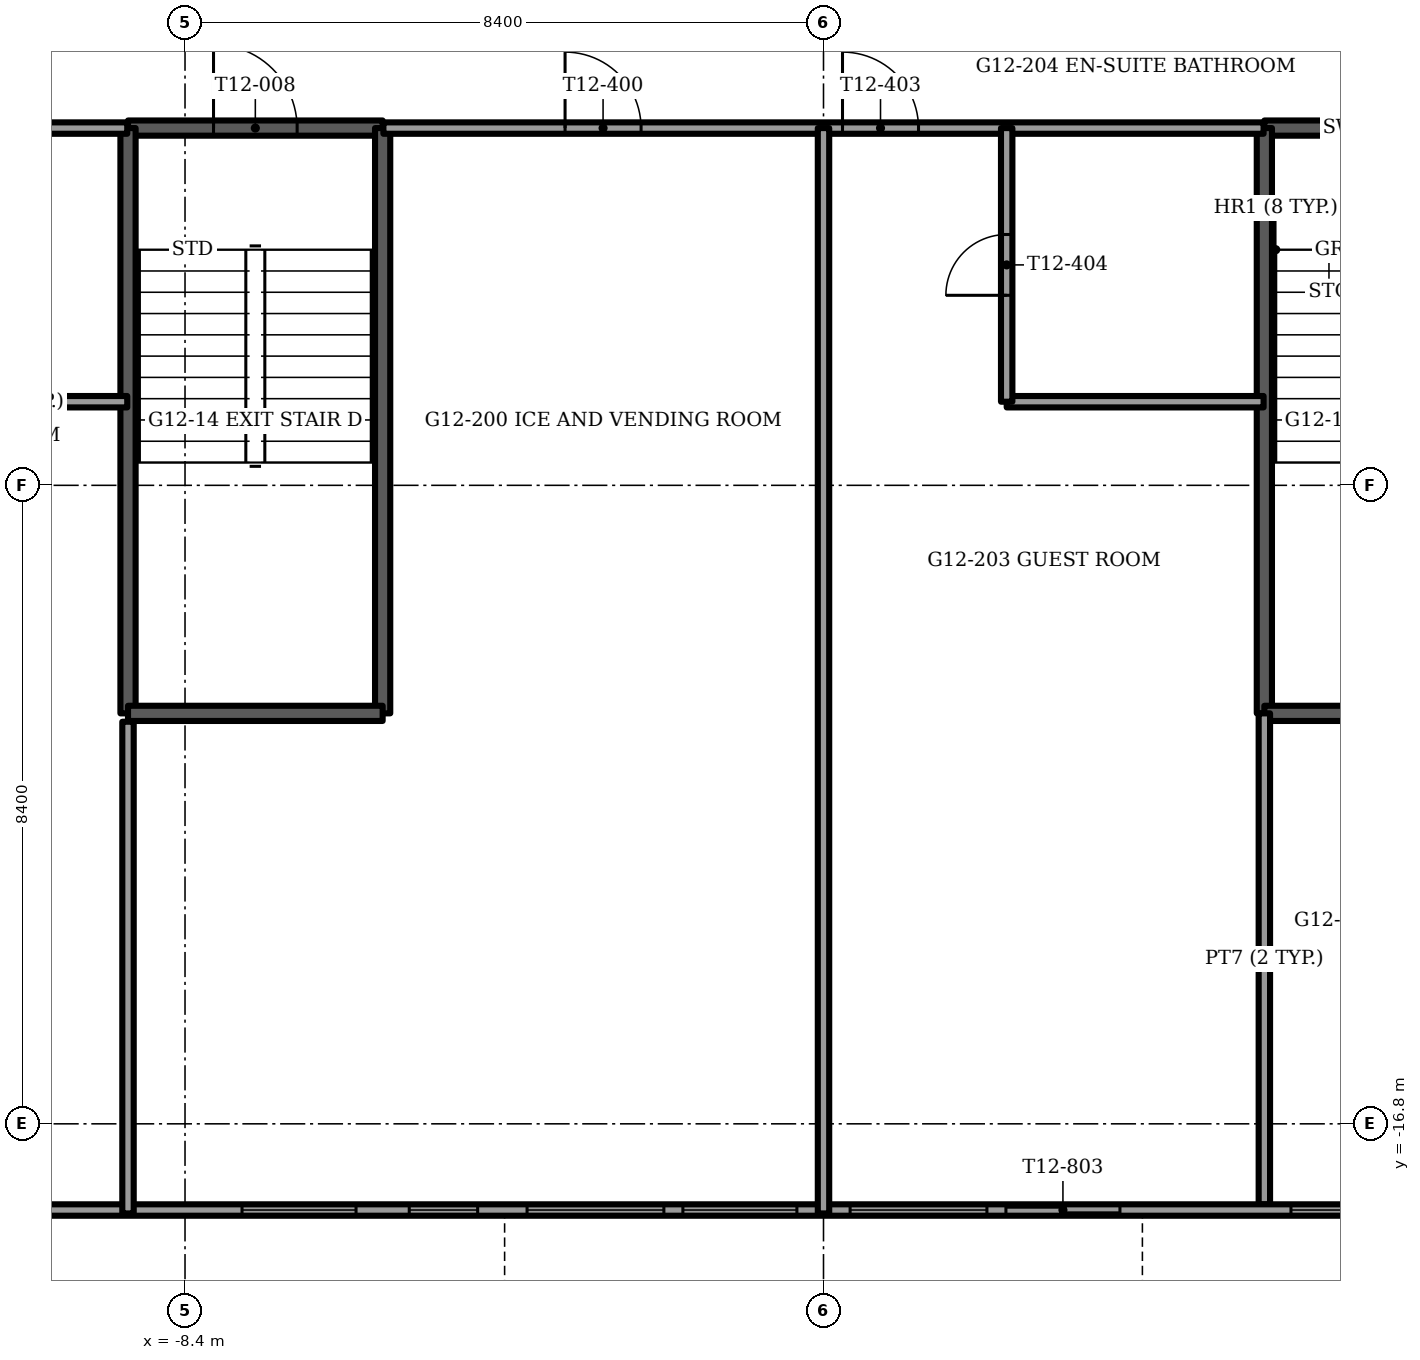
"""IFC4 building model, lengths in metres.
Left out: names, types, materials, properties, quantities, classifications, styles, units other than length and angle.
Written with IfcOpenShell. Run it as: python <this file> out.ifc"""

import sys

from ifc_helpers import new_model, si_unit, direction, frame, frame_2d, origin, place, context, subcontext, project, spatial, rectangle, extrude, element, fill, save


model = new_model("IFC4")
c1 = context("Model", 3, precision=1e-05, world=origin(), true_north=direction((0.0, 1.0)))
c2 = subcontext(c1, "Body", "Model", "MODEL_VIEW")
j1 = project(units=[si_unit("LENGTHUNIT", "METRE"), si_unit("PLANEANGLEUNIT", "RADIAN")], contexts=[c1])
p1 = place(None, origin())
s1 = spatial("IfcSite", under=j1, at=p1, CompositionType="ELEMENT")
p2 = place(p1, origin())
s2 = spatial("IfcBuilding", under=s1, at=p2, CompositionType="ELEMENT")
p3 = place(p2, frame((0.0, 0.0, 50.5)))
s3 = spatial("IfcBuildingStorey", under=s2, at=p3, CompositionType="ELEMENT", Elevation=50.5)
p4 = place(p3, frame((-10.306, -17.934, 0.0), z_axis=(0.0, 0.0, 1.0), x_axis=(1.0, 0.0, 0.0)))
e1 = element("IfcWall", 1, at=p4, inside=s3, PredefinedType="SOLIDWALL", context=c2, shape_type="SweptSolid", body=[
    extrude(rectangle(XDim=20.613, YDim=0.15, at=frame_2d((10.306, 0.0))), origin(), (0.0, 0.0, 1.0), 3.45),
])
p5 = place(p4, frame((4.856, 0.0, 0.15)))
e2 = element("IfcOpeningElement", 2, at=p5, cuts=e1, PredefinedType="OPENING", context=c2, shape_type="SweptSolid", body=[
    extrude(rectangle(XDim=0.9, YDim=2.85, at=frame_2d((0.45, 1.425))), frame((0.0, 0.075, 0.0), z_axis=(0.0, -1.0, 0.0), x_axis=(1.0, 0.0, 0.0)), (0.0, 0.0, 1.0), 0.15),
])
p6 = place(p4, frame((2.656, 0.0, 0.15)))
e3 = element("IfcOpeningElement", 3, at=p6, cuts=e1, PredefinedType="OPENING", context=c2, shape_type="SweptSolid", body=[
    extrude(rectangle(XDim=1.5, YDim=2.85, at=frame_2d((0.75, 1.425))), frame((0.0, 0.075, 0.0), z_axis=(0.0, -1.0, 0.0), x_axis=(1.0, 0.0, 0.0)), (0.0, 0.0, 1.0), 0.15),
])
p7 = place(p4, frame((6.406, 0.0, 0.15)))
e4 = element("IfcOpeningElement", 4, at=p7, cuts=e1, PredefinedType="OPENING", context=c2, shape_type="SweptSolid", body=[
    extrude(rectangle(XDim=1.8, YDim=2.85, at=frame_2d((0.9, 1.425))), frame((0.0, 0.075, 0.0), z_axis=(0.0, -1.0, 0.0), x_axis=(1.0, 0.0, 0.0)), (0.0, 0.0, 1.0), 0.15),
])
p8 = place(p4, frame((8.456, 0.0, 0.15)))
e5 = element("IfcOpeningElement", 5, at=p8, cuts=e1, PredefinedType="OPENING", context=c2, shape_type="SweptSolid", body=[
    extrude(rectangle(XDim=1.5, YDim=2.85, at=frame_2d((0.75, 1.425))), frame((0.0, 0.075, 0.0), z_axis=(0.0, -1.0, 0.0), x_axis=(1.0, 0.0, 0.0)), (0.0, 0.0, 1.0), 0.15),
])
p9 = place(p4, frame((10.656, 0.0, 0.15)))
e6 = element("IfcOpeningElement", 6, at=p9, cuts=e1, PredefinedType="OPENING", context=c2, shape_type="SweptSolid", body=[
    extrude(rectangle(XDim=1.8, YDim=2.85, at=frame_2d((0.9, 1.425))), frame((0.0, 0.075, 0.0), z_axis=(0.0, -1.0, 0.0), x_axis=(1.0, 0.0, 0.0)), (0.0, 0.0, 1.0), 0.15),
])
p10 = place(p4, frame((12.706, 0.0, 0.0)))
e7 = element("IfcOpeningElement", 7, at=p10, cuts=e1, PredefinedType="OPENING", context=c2, shape_type="SweptSolid", body=[
    extrude(rectangle(XDim=1.5, YDim=2.4, at=frame_2d((0.75, 1.2))), frame((0.0, 0.075, 0.0), z_axis=(0.0, -1.0, 0.0), x_axis=(1.0, 0.0, 0.0)), (0.0, 0.0, 1.0), 0.15),
])
p11 = place(p4, frame((16.456, 0.0, 0.15)))
e8 = element("IfcOpeningElement", 8, at=p11, cuts=e1, PredefinedType="OPENING", context=c2, shape_type="SweptSolid", body=[
    extrude(rectangle(XDim=1.8, YDim=2.85, at=frame_2d((0.9, 1.425))), frame((0.0, 0.075, 0.0), z_axis=(0.0, -1.0, 0.0), x_axis=(1.0, 0.0, 0.0)), (0.0, 0.0, 1.0), 0.15),
])
p12 = place(p3, frame((5.8, -3.7, -0.3), z_axis=(0.0, 0.0, 1.0), x_axis=(1.0, 0.0, 0.0)))
e9 = element("IfcWall", 9, at=p12, inside=s3, PredefinedType="SOLIDWALL", context=c2, shape_type="SweptSolid", body=[
    extrude(rectangle(XDim=3.35, YDim=0.2, at=frame_2d((1.675, 0.0))), origin(), (0.0, 0.0, 1.0), 3.75),
])
p13 = place(p12, frame((1.125, 0.0, 0.0)))
e10 = element("IfcOpeningElement", 10, at=p13, cuts=e9, PredefinedType="OPENING", context=c2, shape_type="SweptSolid", body=[
    extrude(rectangle(XDim=1.1, YDim=2.1, at=frame_2d((0.55, 1.05))), frame((0.0, 0.1, 0.0), z_axis=(0.0, -1.0, 0.0), x_axis=(1.0, 0.0, 0.0)), (0.0, 0.0, 1.0), 0.2),
])
p14 = place(p3, frame((5.8, -3.7, -0.3), z_axis=(0.0, 0.0, 1.0), x_axis=(0.0, -1.0, 0.0)))
e11 = element("IfcWall", 11, at=p14, inside=s3, PredefinedType="SOLIDWALL", context=c2, shape_type="SweptSolid", body=[
    extrude(rectangle(XDim=7.7, YDim=0.2, at=frame_2d((3.85, 0.0))), origin(), (0.0, 0.0, 1.0), 3.75),
])
p15 = place(p3, frame((5.8, -11.4, -0.3), z_axis=(0.0, 0.0, 1.0), x_axis=(1.0, 0.0, 0.0)))
e12 = element("IfcWall", 12, at=p15, inside=s3, PredefinedType="SOLIDWALL", context=c2, shape_type="SweptSolid", body=[
    extrude(rectangle(XDim=3.35, YDim=0.2, at=frame_2d((1.675, 0.0))), origin(), (0.0, 0.0, 1.0), 3.75),
])
p16 = place(p3, frame((5.8, -11.4, 0.0), z_axis=(0.0, 0.0, 1.0), x_axis=(0.0, -1.0, 0.0)))
e13 = element("IfcWall", 13, at=p16, inside=s3, PredefinedType="PARTITIONING", context=c2, shape_type="SweptSolid", body=[
    extrude(rectangle(XDim=6.459, YDim=0.15, at=frame_2d((3.229, 0.0))), origin(), (0.0, 0.0, 1.0), 3.45),
])
p17 = place(p3, frame((-9.15, -3.7, -0.3), z_axis=(0.0, 0.0, 1.0), x_axis=(1.0, 0.0, 0.0)))
e14 = element("IfcWall", 14, at=p17, inside=s3, PredefinedType="SOLIDWALL", context=c2, shape_type="SweptSolid", body=[
    extrude(rectangle(XDim=3.35, YDim=0.2, at=frame_2d((1.675, 0.0))), origin(), (0.0, 0.0, 1.0), 3.75),
])
p18 = place(p17, frame((1.125, 0.0, 0.0)))
e15 = element("IfcOpeningElement", 15, at=p18, cuts=e14, PredefinedType="OPENING", context=c2, shape_type="SweptSolid", body=[
    extrude(rectangle(XDim=1.1, YDim=2.1, at=frame_2d((0.55, 1.05))), frame((0.0, 0.1, 0.0), z_axis=(0.0, -1.0, 0.0), x_axis=(1.0, 0.0, 0.0)), (0.0, 0.0, 1.0), 0.2),
])
for number, where, z_axis, x_axis in (
    (16, (-9.15, -3.7, -0.3), (0.0, 0.0, 1.0), (0.0, -1.0, 0.0)),
    (17, (-5.8, -3.7, -0.3), (0.0, 0.0, 1.0), (0.0, -1.0, 0.0)),
):
    element("IfcWall", number, at=place(p3, frame(where, z_axis=z_axis, x_axis=x_axis)), inside=s3, PredefinedType="SOLIDWALL", context=c2, shape_type="SweptSolid", body=[
        extrude(rectangle(XDim=7.7, YDim=0.2, at=frame_2d((3.85, 0.0))), origin(), (0.0, 0.0, 1.0), 3.75),
    ])
p19 = place(p3, frame((-9.15, -11.4, -0.3), z_axis=(0.0, 0.0, 1.0), x_axis=(1.0, 0.0, 0.0)))
e18 = element("IfcWall", 18, at=p19, inside=s3, PredefinedType="SOLIDWALL", context=c2, shape_type="SweptSolid", body=[
    extrude(rectangle(XDim=3.35, YDim=0.2, at=frame_2d((1.675, 0.0))), origin(), (0.0, 0.0, 1.0), 3.75),
])
p20 = place(p3, frame((-12.55, -7.3, 0.0), z_axis=(0.0, 0.0, 1.0), x_axis=(1.0, 0.0, 0.0)))
e19 = element("IfcWall", 19, at=p20, inside=s3, PredefinedType="PARTITIONING", context=c2, shape_type="SweptSolid", body=[
    extrude(rectangle(XDim=3.39, YDim=0.15, at=frame_2d((1.695, 0.0))), origin(), (0.0, 0.0, 1.0), 3.45),
])
p21 = place(p3, frame((2.41, -7.3, 0.0), z_axis=(0.0, 0.0, 1.0), x_axis=(1.0, 0.0, 0.0)))
e20 = element("IfcWall", 20, at=p21, inside=s3, PredefinedType="PARTITIONING", context=c2, shape_type="SweptSolid", body=[
    extrude(rectangle(XDim=3.38, YDim=0.15, at=frame_2d((1.69, 0.0))), origin(), (0.0, 0.0, 1.0), 3.45),
])
p22 = place(p3, frame((-19.191, -3.7, 0.0), z_axis=(0.0, 0.0, 1.0), x_axis=(1.0, 0.0, 0.0)))
e21 = element("IfcWall", 21, at=p22, inside=s3, PredefinedType="PARTITIONING", context=c2, shape_type="SweptSolid", body=[
    extrude(rectangle(XDim=10.031, YDim=0.15, at=frame_2d((5.016, 0.0))), origin(), (0.0, 0.0, 1.0), 3.45),
])
p23 = place(p22, frame((5.566, 0.0, 0.0)))
e22 = element("IfcOpeningElement", 22, at=p23, cuts=e21, PredefinedType="OPENING", context=c2, shape_type="SweptSolid", body=[
    extrude(rectangle(XDim=1.0, YDim=2.1, at=frame_2d((0.5, 1.05))), frame((0.0, 0.075, 0.0), z_axis=(0.0, -1.0, 0.0), x_axis=(1.0, 0.0, 0.0)), (0.0, 0.0, 1.0), 0.15),
])
p24 = place(p3, frame((-5.79, -3.7, 0.0), z_axis=(0.0, 0.0, 1.0), x_axis=(1.0, 0.0, 0.0)))
e23 = element("IfcWall", 23, at=p24, inside=s3, PredefinedType="PARTITIONING", context=c2, shape_type="SweptSolid", body=[
    extrude(rectangle(XDim=11.58, YDim=0.15, at=frame_2d((5.79, 0.0))), origin(), (0.0, 0.0, 1.0), 3.45),
])
p25 = place(p24, frame((2.39, 0.0, 0.0)))
e24 = element("IfcOpeningElement", 24, at=p25, cuts=e23, PredefinedType="OPENING", context=c2, shape_type="SweptSolid", body=[
    extrude(rectangle(XDim=1.0, YDim=2.1, at=frame_2d((0.5, 1.05))), frame((0.0, 0.075, 0.0), z_axis=(0.0, -1.0, 0.0), x_axis=(1.0, 0.0, 0.0)), (0.0, 0.0, 1.0), 0.15),
])
p26 = place(p24, frame((6.04, 0.0, 0.0)))
e25 = element("IfcOpeningElement", 25, at=p26, cuts=e23, PredefinedType="OPENING", context=c2, shape_type="SweptSolid", body=[
    extrude(rectangle(XDim=1.0, YDim=2.1, at=frame_2d((0.5, 1.05))), frame((0.0, 0.075, 0.0), z_axis=(0.0, -1.0, 0.0), x_axis=(1.0, 0.0, 0.0)), (0.0, 0.0, 1.0), 0.15),
])
p27 = place(p3, frame((2.41, -7.3, 0.0), z_axis=(0.0, 0.0, 1.0), x_axis=(0.0, 1.0, 0.0)))
e26 = element("IfcWall", 26, at=p27, inside=s3, PredefinedType="PARTITIONING", context=c2, shape_type="SweptSolid", body=[
    extrude(rectangle(XDim=3.6, YDim=0.15, at=frame_2d((1.8, 0.0))), origin(), (0.0, 0.0, 1.0), 3.45),
])
p28 = place(p27, frame((1.4, 0.0, 0.0)))
e27 = element("IfcOpeningElement", 27, at=p28, cuts=e26, PredefinedType="OPENING", context=c2, shape_type="SweptSolid", body=[
    extrude(rectangle(XDim=0.8, YDim=2.1, at=frame_2d((0.4, 1.05))), frame((0.0, 0.075, 0.0), z_axis=(0.0, -1.0, 0.0), x_axis=(1.0, 0.0, 0.0)), (0.0, 0.0, 1.0), 0.15),
])
p29 = place(p3, frame((0.0, -17.979, 0.0), z_axis=(0.0, 0.0, 1.0), x_axis=(0.0, 1.0, 0.0)))
e28 = element("IfcWall", 28, at=p29, inside=s3, PredefinedType="PARTITIONING", context=c2, shape_type="SweptSolid", body=[
    extrude(rectangle(XDim=14.279, YDim=0.15, at=frame_2d((7.14, 0.0))), origin(), (0.0, 0.0, 1.0), 3.45),
])
p30 = place(p3, frame((-9.15, -17.979, 0.0), z_axis=(0.0, 0.0, 1.0), x_axis=(0.0, 1.0, 0.0)))
e29 = element("IfcWall", 29, at=p30, inside=s3, PredefinedType="PARTITIONING", context=c2, shape_type="SweptSolid", body=[
    extrude(rectangle(XDim=6.469, YDim=0.15, at=frame_2d((3.234, 0.0))), origin(), (0.0, 0.0, 1.0), 3.45),
])
p31 = place(p5, origin())
e30 = element("IfcWindow", 30, at=p31, inside=s3, PartitioningType="SINGLE_PANEL", PredefinedType="WINDOW", context=c2, shape_type="SweptSolid", body=[
    extrude(rectangle(XDim=0.9, YDim=2.85, at=frame_2d((0.45, 1.425))), frame((0.0, 0.03, 0.0), z_axis=(0.0, -1.0, 0.0), x_axis=(1.0, 0.0, 0.0)), (0.0, 0.0, 1.0), 0.06),
])
fill(e2, e30)
p32 = place(p6, origin())
e31 = element("IfcWindow", 31, at=p32, inside=s3, PartitioningType="SINGLE_PANEL", PredefinedType="WINDOW", context=c2, shape_type="SweptSolid", body=[
    extrude(rectangle(XDim=1.5, YDim=2.85, at=frame_2d((0.75, 1.425))), frame((0.0, 0.03, 0.0), z_axis=(0.0, -1.0, 0.0), x_axis=(1.0, 0.0, 0.0)), (0.0, 0.0, 1.0), 0.06),
])
fill(e3, e31)
p33 = place(p7, origin())
e32 = element("IfcWindow", 32, at=p33, inside=s3, PartitioningType="SINGLE_PANEL", PredefinedType="WINDOW", context=c2, shape_type="SweptSolid", body=[
    extrude(rectangle(XDim=1.8, YDim=2.85, at=frame_2d((0.9, 1.425))), frame((0.0, 0.03, 0.0), z_axis=(0.0, -1.0, 0.0), x_axis=(1.0, 0.0, 0.0)), (0.0, 0.0, 1.0), 0.06),
])
fill(e4, e32)
p34 = place(p8, origin())
e33 = element("IfcWindow", 33, at=p34, inside=s3, PartitioningType="SINGLE_PANEL", PredefinedType="WINDOW", context=c2, shape_type="SweptSolid", body=[
    extrude(rectangle(XDim=1.5, YDim=2.85, at=frame_2d((0.75, 1.425))), frame((0.0, 0.03, 0.0), z_axis=(0.0, -1.0, 0.0), x_axis=(1.0, 0.0, 0.0)), (0.0, 0.0, 1.0), 0.06),
])
fill(e5, e33)
p35 = place(p9, origin())
e34 = element("IfcWindow", 34, at=p35, inside=s3, PartitioningType="SINGLE_PANEL", PredefinedType="WINDOW", context=c2, shape_type="SweptSolid", body=[
    extrude(rectangle(XDim=1.8, YDim=2.85, at=frame_2d((0.9, 1.425))), frame((0.0, 0.03, 0.0), z_axis=(0.0, -1.0, 0.0), x_axis=(1.0, 0.0, 0.0)), (0.0, 0.0, 1.0), 0.06),
])
fill(e6, e34)
p36 = place(p10, origin())
e35 = element("IfcDoor", 35, at=p36, inside=s3, OperationType="SLIDING_TO_LEFT", PredefinedType="DOOR", context=c2, shape_type="SweptSolid", body=[
    extrude(rectangle(XDim=1.5, YDim=2.4, at=frame_2d((0.75, 1.2))), frame((0.0, 0.025, 0.0), z_axis=(0.0, -1.0, 0.0), x_axis=(1.0, 0.0, 0.0)), (0.0, 0.0, 1.0), 0.05),
])
fill(e7, e35)
p37 = place(p11, origin())
e36 = element("IfcWindow", 36, at=p37, inside=s3, PartitioningType="SINGLE_PANEL", PredefinedType="WINDOW", context=c2, shape_type="SweptSolid", body=[
    extrude(rectangle(XDim=1.8, YDim=2.85, at=frame_2d((0.9, 1.425))), frame((0.0, 0.03, 0.0), z_axis=(0.0, -1.0, 0.0), x_axis=(1.0, 0.0, 0.0)), (0.0, 0.0, 1.0), 0.06),
])
fill(e8, e36)
p38 = place(p18, origin())
e37 = element("IfcDoor", 37, at=p38, inside=s3, OperationType="SINGLE_SWING_LEFT", PredefinedType="DOOR", context=c2, shape_type="SweptSolid", body=[
    extrude(rectangle(XDim=1.1, YDim=2.1, at=frame_2d((0.55, 1.05))), frame((0.0, 0.025, 0.0), z_axis=(0.0, -1.0, 0.0), x_axis=(1.0, 0.0, 0.0)), (0.0, 0.0, 1.0), 0.05),
])
fill(e15, e37)
p39 = place(p25, origin())
e38 = element("IfcDoor", 38, at=p39, inside=s3, OperationType="SINGLE_SWING_RIGHT", PredefinedType="DOOR", context=c2, shape_type="SweptSolid", body=[
    extrude(rectangle(XDim=1.0, YDim=2.1, at=frame_2d((0.5, 1.05))), frame((0.0, 0.025, 0.0), z_axis=(0.0, -1.0, 0.0), x_axis=(1.0, 0.0, 0.0)), (0.0, 0.0, 1.0), 0.05),
])
fill(e24, e38)
p40 = place(p26, origin())
e39 = element("IfcDoor", 39, at=p40, inside=s3, OperationType="SINGLE_SWING_LEFT", PredefinedType="DOOR", context=c2, shape_type="SweptSolid", body=[
    extrude(rectangle(XDim=1.0, YDim=2.1, at=frame_2d((0.5, 1.05))), frame((0.0, 0.025, 0.0), z_axis=(0.0, -1.0, 0.0), x_axis=(1.0, 0.0, 0.0)), (0.0, 0.0, 1.0), 0.05),
])
fill(e25, e39)
p41 = place(p28, origin())
e40 = element("IfcDoor", 40, at=p41, inside=s3, OperationType="SINGLE_SWING_RIGHT", PredefinedType="DOOR", context=c2, shape_type="SweptSolid", body=[
    extrude(rectangle(XDim=0.8, YDim=2.1, at=frame_2d((0.4, 1.05))), frame((0.0, 0.025, 0.0), z_axis=(0.0, -1.0, 0.0), x_axis=(1.0, 0.0, 0.0)), (0.0, 0.0, 1.0), 0.05),
])
fill(e27, e40)
save(model, sys.argv[1])
